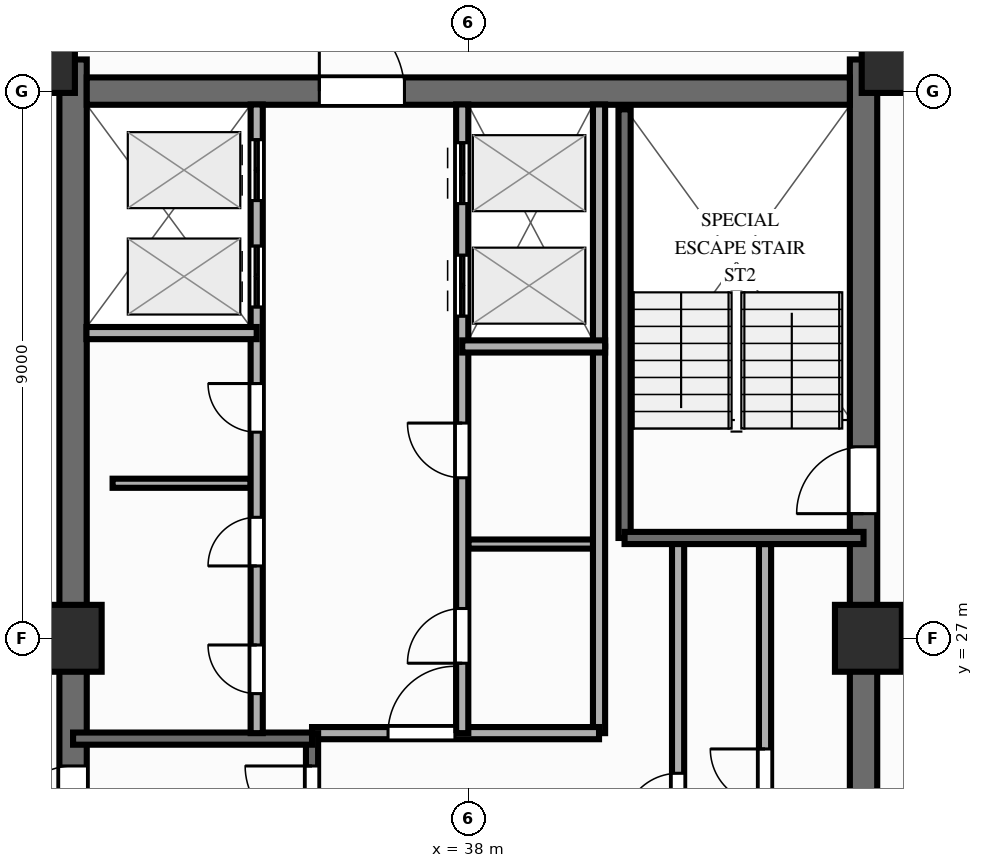
"""IFC4 building model, lengths in metres.
Left out: names, types, materials, properties, quantities, classifications, styles, units other than length and angle.
Written with IfcOpenShell. Run it as: python <this file> out.ifc"""

import sys

from ifc_helpers import new_model, si_unit, direction, frame, frame_2d, origin, origin_2d, place, context, subcontext, project, spatial, rectangle, extrude, source, transform, mapped, element, fill, save


model = new_model("IFC4")
c1 = context("Model", 3, precision=1e-05, world=origin(), true_north=direction((0.0, 1.0)))
c2 = subcontext(c1, "Body", "Model", "MODEL_VIEW")
j1 = project(units=[si_unit("LENGTHUNIT", "METRE"), si_unit("PLANEANGLEUNIT", "RADIAN")], contexts=[c1])
p1 = place(None, origin())
s1 = spatial("IfcSite", under=j1, at=p1, CompositionType="ELEMENT")
p2 = place(p1, origin())
s2 = spatial("IfcBuilding", under=s1, at=p2, CompositionType="ELEMENT")
p3 = place(p2, frame((0.0, 0.0, 176.8)))
s3 = spatial("IfcBuildingStorey", under=s2, at=p3, CompositionType="ELEMENT", Elevation=176.8)
p4 = place(p3, frame((31.5, 17.48, 0.0), z_axis=(0.0, 0.0, 1.0), x_axis=(0.0, 1.0, 0.0)))
e1 = element("IfcWall", 1, at=p4, inside=s3, PredefinedType="SHEAR", context=c2, shape_type="SweptSolid", body=[
    extrude(rectangle(XDim=19.04, YDim=0.45, at=frame_2d((9.52, 0.0))), origin(), (0.0, 0.0, 1.0), 3.0),
])
p5 = place(p4, frame((6.32, 0.0, 0.0)))
e2 = element("IfcOpeningElement", 2, at=p5, cuts=e1, PredefinedType="OPENING", context=c2, shape_type="SweptSolid", body=[
    extrude(rectangle(XDim=1.1, YDim=2.15, at=frame_2d((0.55, 1.075))), frame((0.0, 0.237, 0.0), z_axis=(0.0, -1.0, 0.0), x_axis=(1.0, 0.0, 0.0)), (0.0, 0.0, 1.0), 0.474),
])
p6 = place(p3, frame((44.5, 17.48, 0.0), z_axis=(0.0, 0.0, 1.0), x_axis=(0.0, 1.0, 0.0)))
e3 = element("IfcWall", 3, at=p6, inside=s3, PredefinedType="SHEAR", context=c2, shape_type="SweptSolid", body=[
    extrude(rectangle(XDim=19.04, YDim=0.45, at=frame_2d((9.52, 0.0))), origin(), (0.0, 0.0, 1.0), 3.0),
])
p7 = place(p6, frame((12.67, 0.0, 0.0), z_axis=(0.0, 0.0, 1.0), x_axis=(-1.0, 0.0, 0.0)))
e4 = element("IfcOpeningElement", 4, at=p7, cuts=e3, PredefinedType="OPENING", context=c2, shape_type="SweptSolid", body=[
    extrude(rectangle(XDim=1.1, YDim=2.15, at=frame_2d((0.55, 1.075))), frame((0.0, 0.237, 0.0), z_axis=(0.0, -1.0, 0.0), x_axis=(1.0, 0.0, 0.0)), (0.0, 0.0, 1.0), 0.474),
])
p8 = place(p3, frame((31.725, 36.0, 0.0), z_axis=(0.0, 0.0, 1.0), x_axis=(1.0, 0.0, 0.0)))
e5 = element("IfcWall", 5, at=p8, inside=s3, PredefinedType="SHEAR", context=c2, shape_type="SweptSolid", body=[
    extrude(rectangle(XDim=12.55, YDim=0.45, at=frame_2d((6.275, 0.0))), origin(), (0.0, 0.0, 1.0), 3.0),
])
p9 = place(p8, frame((5.225, 0.0, 0.0), z_axis=(0.0, 0.0, 1.0), x_axis=(-1.0, 0.0, 0.0)))
e6 = element("IfcOpeningElement", 6, at=p9, cuts=e5, PredefinedType="OPENING", context=c2, shape_type="SweptSolid", body=[
    extrude(rectangle(XDim=1.4, YDim=2.15, at=frame_2d((0.7, 1.075))), frame((0.0, 0.237, 0.0), z_axis=(0.0, -1.0, 0.0), x_axis=(1.0, 0.0, 0.0)), (0.0, 0.0, 1.0), 0.474),
])
m1 = source(origin(), c2, "Body", "SweptSolid", [
    extrude(rectangle(XDim=1.1, YDim=1.1, at=origin_2d()), origin(), (0.0, 0.0, 1.0), 3.0),
])
for number, where, z_axis, x_axis in (
    (7, (30.98, 36.52, 0.0), (0.0, 0.0, 1.0), (1.0, 0.0, 0.0)),
    (8, (45.02, 36.52, 0.0), (0.0, 0.0, 1.0), (1.0, 0.0, 0.0)),
    (9, (31.42, 27.0, 0.0), (0.0, 0.0, 1.0), (1.0, 0.0, 0.0)),
    (10, (44.58, 27.0, 0.0), (0.0, 0.0, 1.0), (1.0, 0.0, 0.0)),
):
    element("IfcColumn", number, at=place(p3, frame(where, z_axis=z_axis, x_axis=x_axis)), inside=s3, PredefinedType="COLUMN", context=c2, shape_type="MappedRepresentation", body=[
        mapped(m1, transform((0.0, 0.0, 0.0), scale=1.0)),
    ])
p10 = place(p3, frame((32.15, 29.55, 0.0), z_axis=(0.0, 0.0, 1.0), x_axis=(1.0, 0.0, 0.0)))
e11 = element("IfcWall", 11, at=p10, inside=s3, PredefinedType="PARTITIONING", context=c2, shape_type="SweptSolid", body=[
    extrude(rectangle(XDim=2.27, YDim=0.15, at=frame_2d((1.135, 0.0))), origin(), (0.0, 0.0, 1.0), 2.79),
])
p11 = place(p3, frame((38.0, 28.55, 0.0), z_axis=(0.0, 0.0, 1.0), x_axis=(1.0, 0.0, 0.0)))
e12 = element("IfcWall", 12, at=p11, inside=s3, PredefinedType="PARTITIONING", context=c2, shape_type="SweptSolid", body=[
    extrude(rectangle(XDim=2.2, YDim=0.15, at=frame_2d((1.1, 0.0))), origin(), (0.0, 0.0, 1.0), 2.14),
])
p12 = place(p3, frame((42.88, 21.08, 0.0), z_axis=(0.0, 0.0, 1.0), x_axis=(0.0, 1.0, 0.0)))
e13 = element("IfcWall", 13, at=p12, inside=s3, PredefinedType="PARTITIONING", context=c2, shape_type="SweptSolid", body=[
    extrude(rectangle(XDim=7.47, YDim=0.2, at=frame_2d((3.735, 0.0))), origin(), (0.0, 0.0, 1.0), 2.79),
])
p13 = place(p12, frame((3.2, 0.0, 0.0)))
e14 = element("IfcOpeningElement", 14, at=p13, cuts=e13, PredefinedType="OPENING", context=c2, shape_type="SweptSolid", body=[
    extrude(rectangle(XDim=0.9, YDim=2.1, at=frame_2d((0.45, 1.05))), frame((0.0, 0.112, 0.0), z_axis=(0.0, -1.0, 0.0), x_axis=(1.0, 0.0, 0.0)), (0.0, 0.0, 1.0), 0.224),
])
p14 = place(p3, frame((41.45, 21.08, 0.0), z_axis=(0.0, 0.0, 1.0), x_axis=(0.0, 1.0, 0.0)))
e15 = element("IfcWall", 15, at=p14, inside=s3, PredefinedType="PARTITIONING", context=c2, shape_type="SweptSolid", body=[
    extrude(rectangle(XDim=7.52, YDim=0.2, at=frame_2d((3.76, 0.0))), origin(), (0.0, 0.0, 1.0), 2.79),
])
p15 = place(p14, frame((2.8, 0.0, 0.0)))
e16 = element("IfcOpeningElement", 16, at=p15, cuts=e15, PredefinedType="OPENING", context=c2, shape_type="SweptSolid", body=[
    extrude(rectangle(XDim=0.9, YDim=2.1, at=frame_2d((0.45, 1.05))), frame((0.0, 0.112, 0.0), z_axis=(0.0, -1.0, 0.0), x_axis=(1.0, 0.0, 0.0)), (0.0, 0.0, 1.0), 0.224),
])
p16 = place(p3, frame((40.15, 25.44, 0.0), z_axis=(0.0, 0.0, 1.0), x_axis=(0.0, 1.0, 0.0)))
e17 = element("IfcWall", 17, at=p16, inside=s3, PredefinedType="PARTITIONING", context=c2, shape_type="SweptSolid", body=[
    extrude(rectangle(XDim=6.36, YDim=0.2, at=frame_2d((3.18, 0.0))), origin(), (0.0, 0.0, 1.0), 2.79),
])
p17 = place(p3, frame((40.15, 31.8, 0.0), z_axis=(0.0, 0.0, 1.0), x_axis=(0.0, 1.0, 0.0)))
e18 = element("IfcWall", 18, at=p17, inside=s3, PredefinedType="PARTITIONING", context=c2, shape_type="SweptSolid", body=[
    extrude(rectangle(XDim=3.98, YDim=0.2, at=frame_2d((1.99, 0.0))), origin(), (0.0, 0.0, 1.0), 2.79),
])
p18 = place(p3, frame((35.43, 25.44, 0.0), z_axis=(0.0, 0.0, 1.0), x_axis=(1.0, 0.0, 0.0)))
e19 = element("IfcWall", 19, at=p18, inside=s3, PredefinedType="PARTITIONING", context=c2, shape_type="SweptSolid", body=[
    extrude(rectangle(XDim=4.72, YDim=0.2, at=frame_2d((2.36, 0.0))), origin(), (0.0, 0.0, 1.0), 2.79),
])
p19 = place(p18, frame((1.25, 0.0, 0.0)))
e20 = element("IfcOpeningElement", 20, at=p19, cuts=e19, PredefinedType="OPENING", context=c2, shape_type="SweptSolid", body=[
    extrude(rectangle(XDim=1.1, YDim=2.15, at=frame_2d((0.55, 1.075))), frame((0.0, 0.112, 0.0), z_axis=(0.0, -1.0, 0.0), x_axis=(1.0, 0.0, 0.0)), (0.0, 0.0, 1.0), 0.224),
])
p20 = place(p3, frame((35.43, 18.22, 0.0), z_axis=(0.0, 0.0, 1.0), x_axis=(0.0, 1.0, 0.0)))
e21 = element("IfcWall", 21, at=p20, inside=s3, PredefinedType="SOLIDWALL", context=c2, shape_type="SweptSolid", body=[
    extrude(rectangle(XDim=7.22, YDim=0.2, at=frame_2d((3.61, 0.0))), origin(), (0.0, 0.0, 1.0), 2.79),
])
p21 = place(p20, frame((6.68, 0.0, 0.0), z_axis=(0.0, 0.0, 1.0), x_axis=(-1.0, 0.0, 0.0)))
e22 = element("IfcOpeningElement", 22, at=p21, cuts=e21, PredefinedType="OPENING", context=c2, shape_type="SweptSolid", body=[
    extrude(rectangle(XDim=1.1, YDim=2.15, at=frame_2d((0.55, 1.075))), frame((0.0, 0.112, 0.0), z_axis=(0.0, -1.0, 0.0), x_axis=(1.0, 0.0, 0.0)), (0.0, 0.0, 1.0), 0.224),
])
p22 = place(p3, frame((31.5, 25.35, 0.0), z_axis=(0.0, 0.0, 1.0), x_axis=(1.0, 0.0, 0.0)))
e23 = element("IfcWall", 23, at=p22, inside=s3, PredefinedType="SOLIDWALL", context=c2, shape_type="SweptSolid", body=[
    extrude(rectangle(XDim=3.93, YDim=0.2, at=frame_2d((1.965, 0.0))), origin(), (0.0, 0.0, 1.0), 2.79),
])
p23 = place(p3, frame((40.57, 28.65, 0.0), z_axis=(0.0, 0.0, 1.0), x_axis=(0.0, 1.0, 0.0)))
e24 = element("IfcWall", 24, at=p23, inside=s3, PredefinedType="SOLIDWALL", context=c2, shape_type="SweptSolid", body=[
    extrude(rectangle(XDim=7.05, YDim=0.2, at=frame_2d((3.525, 0.0))), origin(), (0.0, 0.0, 1.0), 2.79),
])
p24 = place(p3, frame((40.57, 28.65, 0.0), z_axis=(0.0, 0.0, 1.0), x_axis=(1.0, 0.0, 0.0)))
e25 = element("IfcWall", 25, at=p24, inside=s3, PredefinedType="SOLIDWALL", context=c2, shape_type="SweptSolid", body=[
    extrude(rectangle(XDim=3.93, YDim=0.2, at=frame_2d((1.965, 0.0))), origin(), (0.0, 0.0, 1.0), 2.79),
])
p25 = place(p3, frame((34.52, 25.44, 0.0), z_axis=(0.0, 0.0, 1.0), x_axis=(0.0, 1.0, 0.0)))
e26 = element("IfcWall", 26, at=p25, inside=s3, PredefinedType="PARTITIONING", context=c2, shape_type="SweptSolid", body=[
    extrude(rectangle(XDim=10.34, YDim=0.2, at=frame_2d((5.17, 0.0))), origin(), (0.0, 0.0, 1.0), 2.79),
])
p26 = place(p25, frame((0.65, 0.0, 0.0)))
e27 = element("IfcOpeningElement", 27, at=p26, cuts=e26, PredefinedType="OPENING", context=c2, shape_type="SweptSolid", body=[
    extrude(rectangle(XDim=0.8, YDim=2.05, at=frame_2d((0.4, 1.025))), frame((0.0, 0.112, 0.0), z_axis=(0.0, -1.0, 0.0), x_axis=(1.0, 0.0, 0.0)), (0.0, 0.0, 1.0), 0.224),
])
p27 = place(p25, frame((2.75, 0.0, 0.0)))
e28 = element("IfcOpeningElement", 28, at=p27, cuts=e26, PredefinedType="OPENING", context=c2, shape_type="SweptSolid", body=[
    extrude(rectangle(XDim=0.8, YDim=2.05, at=frame_2d((0.4, 1.025))), frame((0.0, 0.112, 0.0), z_axis=(0.0, -1.0, 0.0), x_axis=(1.0, 0.0, 0.0)), (0.0, 0.0, 1.0), 0.224),
])
p28 = place(p25, frame((4.95, 0.0, 0.0)))
e29 = element("IfcOpeningElement", 29, at=p28, cuts=e26, PredefinedType="OPENING", context=c2, shape_type="SweptSolid", body=[
    extrude(rectangle(XDim=0.8, YDim=2.05, at=frame_2d((0.4, 1.025))), frame((0.0, 0.112, 0.0), z_axis=(0.0, -1.0, 0.0), x_axis=(1.0, 0.0, 0.0)), (0.0, 0.0, 1.0), 0.224),
])
p29 = place(p25, frame((7.01, 0.0, 0.0)))
e30 = element("IfcOpeningElement", 30, at=p29, cuts=e26, PredefinedType="OPENING", context=c2, shape_type="SweptSolid", body=[
    extrude(rectangle(XDim=1.0, YDim=2.15, at=frame_2d((0.5, 1.075))), frame((0.0, 0.112, 0.0), z_axis=(0.0, -1.0, 0.0), x_axis=(1.0, 0.0, 0.0)), (0.0, 0.0, 1.0), 0.224),
])
p30 = place(p25, frame((8.76, 0.0, 0.0)))
e31 = element("IfcOpeningElement", 31, at=p30, cuts=e26, PredefinedType="OPENING", context=c2, shape_type="SweptSolid", body=[
    extrude(rectangle(XDim=1.0, YDim=2.15, at=frame_2d((0.5, 1.075))), frame((0.0, 0.112, 0.0), z_axis=(0.0, -1.0, 0.0), x_axis=(1.0, 0.0, 0.0)), (0.0, 0.0, 1.0), 0.224),
])
p31 = place(p3, frame((31.72, 32.02, 0.0), z_axis=(0.0, 0.0, 1.0), x_axis=(1.0, 0.0, 0.0)))
e32 = element("IfcWall", 32, at=p31, inside=s3, PredefinedType="PARTITIONING", context=c2, shape_type="SweptSolid", body=[
    extrude(rectangle(XDim=2.8, YDim=0.2, at=frame_2d((1.4, 0.0))), origin(), (0.0, 0.0, 1.0), 2.79),
])
p32 = place(p3, frame((37.9, 25.44, 0.0), z_axis=(0.0, 0.0, 1.0), x_axis=(0.0, 1.0, 0.0)))
e33 = element("IfcWall", 33, at=p32, inside=s3, PredefinedType="PARTITIONING", context=c2, shape_type="SweptSolid", body=[
    extrude(rectangle(XDim=10.34, YDim=0.2, at=frame_2d((5.17, 0.0))), origin(), (0.0, 0.0, 1.0), 2.79),
])
p33 = place(p32, frame((1.15, 0.0, 0.0)))
e34 = element("IfcOpeningElement", 34, at=p33, cuts=e33, PredefinedType="OPENING", context=c2, shape_type="SweptSolid", body=[
    extrude(rectangle(XDim=0.9, YDim=2.1, at=frame_2d((0.45, 1.05))), frame((0.0, 0.112, 0.0), z_axis=(0.0, -1.0, 0.0), x_axis=(1.0, 0.0, 0.0)), (0.0, 0.0, 1.0), 0.224),
])
p34 = place(p32, frame((4.2, 0.0, 0.0)))
e35 = element("IfcOpeningElement", 35, at=p34, cuts=e33, PredefinedType="OPENING", context=c2, shape_type="SweptSolid", body=[
    extrude(rectangle(XDim=0.9, YDim=2.1, at=frame_2d((0.45, 1.05))), frame((0.0, 0.112, 0.0), z_axis=(0.0, -1.0, 0.0), x_axis=(1.0, 0.0, 0.0)), (0.0, 0.0, 1.0), 0.224),
])
p35 = place(p32, frame((6.86, 0.0, 0.0)))
e36 = element("IfcOpeningElement", 36, at=p35, cuts=e33, PredefinedType="OPENING", context=c2, shape_type="SweptSolid", body=[
    extrude(rectangle(XDim=1.0, YDim=2.15, at=frame_2d((0.5, 1.075))), frame((0.0, 0.112, 0.0), z_axis=(0.0, -1.0, 0.0), x_axis=(1.0, 0.0, 0.0)), (0.0, 0.0, 1.0), 0.224),
])
p36 = place(p32, frame((8.71, 0.0, 0.0)))
e37 = element("IfcOpeningElement", 37, at=p36, cuts=e33, PredefinedType="OPENING", context=c2, shape_type="SweptSolid", body=[
    extrude(rectangle(XDim=1.0, YDim=2.15, at=frame_2d((0.5, 1.075))), frame((0.0, 0.112, 0.0), z_axis=(0.0, -1.0, 0.0), x_axis=(1.0, 0.0, 0.0)), (0.0, 0.0, 1.0), 0.224),
])
p37 = place(p3, frame((37.9, 31.8, 0.0), z_axis=(0.0, 0.0, 1.0), x_axis=(1.0, 0.0, 0.0)))
e38 = element("IfcWall", 38, at=p37, inside=s3, PredefinedType="PARTITIONING", context=c2, shape_type="SweptSolid", body=[
    extrude(rectangle(XDim=2.35, YDim=0.2, at=frame_2d((1.175, 0.0))), origin(), (0.0, 0.0, 1.0), 2.79),
])
m2 = source(origin(), c2, "Body", "SweptSolid", [
    extrude(rectangle(XDim=1.1, YDim=2.15, at=frame_2d((0.55, 1.075))), frame((0.0, 0.025, 0.0), z_axis=(0.0, -1.0, 0.0), x_axis=(1.0, 0.0, 0.0)), (0.0, 0.0, 1.0), 0.05),
])
p38 = place(p5, origin())
e39 = element("IfcDoor", 39, at=p38, inside=s3, OperationType="SINGLE_SWING_LEFT", PredefinedType="DOOR", context=c2, shape_type="MappedRepresentation", body=[
    mapped(m2, transform((0.0, 0.0, 0.0), scale=1.0)),
])
fill(e2, e39)
p39 = place(p7, origin())
e40 = element("IfcDoor", 40, at=p39, inside=s3, OperationType="SINGLE_SWING_RIGHT", PredefinedType="DOOR", context=c2, shape_type="MappedRepresentation", body=[
    mapped(m2, transform((0.0, 0.0, 0.0), scale=1.0)),
])
fill(e4, e40)
m3 = source(origin(), c2, "Body", "SweptSolid", [
    extrude(rectangle(XDim=1.4, YDim=2.15, at=frame_2d((0.7, 1.075))), frame((0.0, 0.025, 0.0), z_axis=(0.0, -1.0, 0.0), x_axis=(1.0, 0.0, 0.0)), (0.0, 0.0, 1.0), 0.05),
])
p40 = place(p9, origin())
e41 = element("IfcDoor", 41, at=p40, inside=s3, OperationType="SINGLE_SWING_RIGHT", PredefinedType="DOOR", context=c2, shape_type="MappedRepresentation", body=[
    mapped(m3, transform((0.0, 0.0, 0.0), scale=1.0)),
])
fill(e6, e41)
m4 = source(origin(), c2, "Body", "SweptSolid", [
    extrude(rectangle(XDim=0.9, YDim=2.1, at=frame_2d((0.45, 1.05))), frame((0.0, 0.025, 0.0), z_axis=(0.0, -1.0, 0.0), x_axis=(1.0, 0.0, 0.0)), (0.0, 0.0, 1.0), 0.05),
])
p41 = place(p13, origin())
e42 = element("IfcDoor", 42, at=p41, inside=s3, OperationType="SINGLE_SWING_RIGHT", PredefinedType="DOOR", context=c2, shape_type="MappedRepresentation", body=[
    mapped(m4, transform((0.0, 0.0, 0.0), scale=1.0)),
])
fill(e14, e42)
p42 = place(p15, origin())
e43 = element("IfcDoor", 43, at=p42, inside=s3, OperationType="SINGLE_SWING_LEFT", PredefinedType="DOOR", context=c2, shape_type="MappedRepresentation", body=[
    mapped(m4, transform((0.0, 0.0, 0.0), scale=1.0)),
])
fill(e16, e43)
p43 = place(p19, origin())
e44 = element("IfcDoor", 44, at=p43, inside=s3, OperationType="SINGLE_SWING_RIGHT", PredefinedType="DOOR", context=c2, shape_type="MappedRepresentation", body=[
    mapped(m2, transform((0.0, 0.0, 0.0), scale=1.0)),
])
fill(e20, e44)
p44 = place(p21, origin())
e45 = element("IfcDoor", 45, at=p44, inside=s3, OperationType="SINGLE_SWING_LEFT", PredefinedType="DOOR", context=c2, shape_type="MappedRepresentation", body=[
    mapped(m2, transform((0.0, 0.0, 0.0), scale=1.0)),
])
fill(e22, e45)
m5 = source(origin(), c2, "Body", "SweptSolid", [
    extrude(rectangle(XDim=0.8, YDim=2.05, at=frame_2d((0.4, 1.025))), frame((0.0, 0.025, 0.0), z_axis=(0.0, -1.0, 0.0), x_axis=(1.0, 0.0, 0.0)), (0.0, 0.0, 1.0), 0.05),
])
p45 = place(p26, origin())
e46 = element("IfcDoor", 46, at=p45, inside=s3, OperationType="SINGLE_SWING_RIGHT", PredefinedType="DOOR", context=c2, shape_type="MappedRepresentation", body=[
    mapped(m5, transform((0.0, 0.0, 0.0), scale=1.0)),
])
fill(e27, e46)
p46 = place(p27, origin())
e47 = element("IfcDoor", 47, at=p46, inside=s3, OperationType="SINGLE_SWING_LEFT", PredefinedType="DOOR", context=c2, shape_type="MappedRepresentation", body=[
    mapped(m5, transform((0.0, 0.0, 0.0), scale=1.0)),
])
fill(e28, e47)
p47 = place(p28, origin())
e48 = element("IfcDoor", 48, at=p47, inside=s3, OperationType="SINGLE_SWING_RIGHT", PredefinedType="DOOR", context=c2, shape_type="MappedRepresentation", body=[
    mapped(m5, transform((0.0, 0.0, 0.0), scale=1.0)),
])
fill(e29, e48)
m6 = source(origin(), c2, "Body", "SweptSolid", [
    extrude(rectangle(XDim=1.0, YDim=2.15, at=frame_2d((0.5, 1.075))), frame((0.0, 0.025, 0.0), z_axis=(0.0, -1.0, 0.0), x_axis=(1.0, 0.0, 0.0)), (0.0, 0.0, 1.0), 0.05),
])
p48 = place(p29, origin())
e49 = element("IfcDoor", 49, at=p48, inside=s3, OperationType="DOUBLE_DOOR_SLIDING", PredefinedType="DOOR", context=c2, shape_type="MappedRepresentation", body=[
    mapped(m6, transform((0.0, 0.0, 0.0), scale=1.0)),
])
fill(e30, e49)
p49 = place(p30, origin())
e50 = element("IfcDoor", 50, at=p49, inside=s3, OperationType="DOUBLE_DOOR_SLIDING", PredefinedType="DOOR", context=c2, shape_type="MappedRepresentation", body=[
    mapped(m6, transform((0.0, 0.0, 0.0), scale=1.0)),
])
fill(e31, e50)
p50 = place(p33, origin())
e51 = element("IfcDoor", 51, at=p50, inside=s3, OperationType="SINGLE_SWING_LEFT", PredefinedType="DOOR", context=c2, shape_type="MappedRepresentation", body=[
    mapped(m4, transform((0.0, 0.0, 0.0), scale=1.0)),
])
fill(e34, e51)
p51 = place(p34, origin())
e52 = element("IfcDoor", 52, at=p51, inside=s3, OperationType="SINGLE_SWING_RIGHT", PredefinedType="DOOR", context=c2, shape_type="MappedRepresentation", body=[
    mapped(m4, transform((0.0, 0.0, 0.0), scale=1.0)),
])
fill(e35, e52)
p52 = place(p35, origin())
e53 = element("IfcDoor", 53, at=p52, inside=s3, OperationType="DOUBLE_DOOR_SLIDING", PredefinedType="DOOR", context=c2, shape_type="MappedRepresentation", body=[
    mapped(m6, transform((0.0, 0.0, 0.0), scale=1.0)),
])
fill(e36, e53)
p53 = place(p36, origin())
e54 = element("IfcDoor", 54, at=p53, inside=s3, OperationType="DOUBLE_DOOR_SLIDING", PredefinedType="DOOR", context=c2, shape_type="MappedRepresentation", body=[
    mapped(m6, transform((0.0, 0.0, 0.0), scale=1.0)),
])
fill(e37, e54)
save(model, sys.argv[1])
